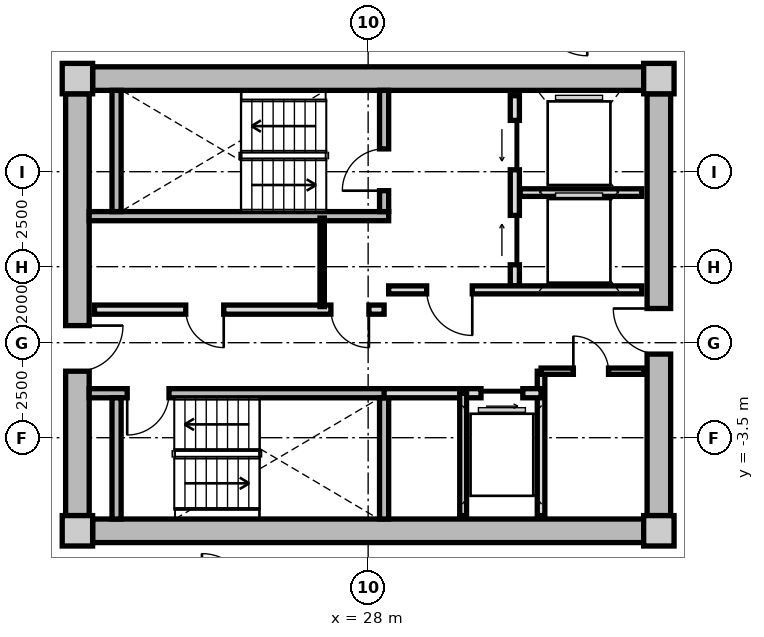
"""IFC4 building model, lengths in metres.
Left out: names, types, materials, properties, quantities, classifications, styles, units other than length and angle.
Written with IfcOpenShell. Run it as: python <this file> out.ifc"""

import sys

from ifc_helpers import new_model, si_unit, direction, frame, frame_2d, origin, origin_2d, place, context, subcontext, project, spatial, rectangle, extrude, source, transform, mapped, element, fill, save


model = new_model("IFC4")
c1 = context("Model", 3, precision=1e-05, world=origin(), true_north=direction((0.0, 1.0)))
c2 = subcontext(c1, "Body", "Model", "MODEL_VIEW")
j1 = project(units=[si_unit("LENGTHUNIT", "METRE"), si_unit("PLANEANGLEUNIT", "RADIAN")], contexts=[c1])
p1 = place(None, origin())
s1 = spatial("IfcSite", under=j1, at=p1, CompositionType="ELEMENT")
p2 = place(p1, origin())
s2 = spatial("IfcBuilding", under=s1, at=p2, CompositionType="ELEMENT")
p3 = place(p2, frame((0.0, 0.0, 158.7)))
s3 = spatial("IfcBuildingStorey", under=s2, at=p3, CompositionType="ELEMENT", Elevation=158.7)
m1 = source(origin(), c2, "Body", "SweptSolid", [
    extrude(rectangle(XDim=0.8, YDim=0.8, at=origin_2d()), origin(), (0.0, 0.0, 1.0), 3.05),
])
for number, where, z_axis, x_axis in (
    (1, (20.35, -5.95, 0.0), (0.0, 0.0, 1.0), (1.0, 0.0, 0.0)),
    (2, (35.65, -5.95, 0.0), (0.0, 0.0, 1.0), (1.0, 0.0, 0.0)),
    (3, (35.65, 5.95, 0.0), (0.0, 0.0, 1.0), (1.0, 0.0, 0.0)),
    (4, (20.35, 5.95, 0.0), (0.0, 0.0, 1.0), (1.0, 0.0, 0.0)),
):
    element("IfcColumn", number, at=place(p3, frame(where, z_axis=z_axis, x_axis=x_axis)), inside=s3, PredefinedType="COLUMN", context=c2, shape_type="MappedRepresentation", body=[
        mapped(m1, transform((0.0, 0.0, 0.0), x_axis=(1.0, 0.0, 0.0), y_axis=(0.0, 1.0, 0.0), z_axis=(0.0, 0.0, 1.0), scale=1.0)),
    ])
m2 = source(origin(), c2, "Body", "SweptSolid", [
    extrude(rectangle(XDim=14.5, YDim=0.62, at=frame_2d((7.25, 0.0))), origin(), (0.0, 0.0, 1.0), 2.81),
])
for number, where, z_axis, x_axis in (
    (5, (20.75, 5.95, 0.0), (0.0, 0.0, 1.0), (1.0, 0.0, 0.0)),
    (6, (35.25, -5.95, 0.0), (0.0, 0.0, 1.0), (-1.0, 0.0, 0.0)),
):
    element("IfcWall", number, at=place(p3, frame(where, z_axis=z_axis, x_axis=x_axis)), inside=s3, PredefinedType="SHEAR", context=c2, shape_type="MappedRepresentation", body=[
        mapped(m2, transform((0.0, 0.0, 0.0), x_axis=(1.0, 0.0, 0.0), y_axis=(0.0, 1.0, 0.0), z_axis=(0.0, 0.0, 1.0), scale=1.0)),
    ])
m3 = source(origin(), c2, "Body", "SweptSolid", [
    extrude(rectangle(XDim=11.1, YDim=0.62, at=frame_2d((5.55, 0.0))), origin(), (0.0, 0.0, 1.0), 2.81),
])
p4 = place(p3, frame((20.35, -5.55, 0.0), z_axis=(0.0, 0.0, 1.0), x_axis=(0.0, 1.0, 0.0)))
e7 = element("IfcWall", 7, at=p4, inside=s3, PredefinedType="SHEAR", context=c2, shape_type="MappedRepresentation", body=[
    mapped(m3, transform((0.0, 0.0, 0.0), x_axis=(1.0, 0.0, 0.0), y_axis=(0.0, 1.0, 0.0), z_axis=(0.0, 0.0, 1.0), scale=1.0)),
])
p5 = place(p4, frame((3.8, 0.0, 0.0)))
e8 = element("IfcOpeningElement", 8, at=p5, cuts=e7, PredefinedType="OPENING", context=c2, shape_type="SweptSolid", body=[
    extrude(rectangle(XDim=1.2, YDim=2.15, at=frame_2d((0.6, 1.075))), frame((0.0, 0.32, 0.0), z_axis=(0.0, -1.0, 0.0), x_axis=(1.0, 0.0, 0.0)), (0.0, 0.0, 1.0), 0.64),
])
p6 = place(p3, frame((35.65, 5.55, 0.0), z_axis=(0.0, 0.0, 1.0), x_axis=(0.0, -1.0, 0.0)))
e9 = element("IfcWall", 9, at=p6, inside=s3, PredefinedType="SHEAR", context=c2, shape_type="MappedRepresentation", body=[
    mapped(m3, transform((0.0, 0.0, 0.0), x_axis=(1.0, 0.0, 0.0), y_axis=(0.0, 1.0, 0.0), z_axis=(0.0, 0.0, 1.0), scale=1.0)),
])
p7 = place(p6, frame((5.65, 0.0, 0.0)))
e10 = element("IfcOpeningElement", 10, at=p7, cuts=e9, PredefinedType="OPENING", context=c2, shape_type="SweptSolid", body=[
    extrude(rectangle(XDim=1.2, YDim=2.15, at=frame_2d((0.6, 1.075))), frame((0.0, 0.32, 0.0), z_axis=(0.0, -1.0, 0.0), x_axis=(1.0, 0.0, 0.0)), (0.0, 0.0, 1.0), 0.64),
])
m4 = source(origin(), c2, "Body", "SweptSolid", [
    extrude(rectangle(XDim=7.88, YDim=0.24, at=frame_2d((3.94, 0.0))), origin(), (0.0, 0.0, 1.0), 2.81),
])
p8 = place(p3, frame((20.66, 2.33, 0.0), z_axis=(0.0, 0.0, 1.0), x_axis=(1.0, 0.0, 0.0)))
e11 = element("IfcWall", 11, at=p8, inside=s3, PredefinedType="PARTITIONING", context=c2, shape_type="MappedRepresentation", body=[
    mapped(m4, transform((0.0, 0.0, 0.0), x_axis=(1.0, 0.0, 0.0), y_axis=(0.0, 1.0, 0.0), z_axis=(0.0, 0.0, 1.0), scale=1.0)),
])
m5 = source(origin(), c2, "Body", "SweptSolid", [
    extrude(rectangle(XDim=3.19, YDim=0.24, at=frame_2d((1.595, 0.0))), origin(), (0.0, 0.0, 1.0), 2.81),
])
p9 = place(p3, frame((21.38, 2.45, 0.0), z_axis=(0.0, 0.0, 1.0), x_axis=(0.0, 1.0, 0.0)))
e12 = element("IfcWall", 12, at=p9, inside=s3, PredefinedType="PARTITIONING", context=c2, shape_type="MappedRepresentation", body=[
    mapped(m5, transform((0.0, 0.0, 0.0), x_axis=(1.0, 0.0, 0.0), y_axis=(0.0, 1.0, 0.0), z_axis=(0.0, 0.0, 1.0), scale=1.0)),
])
p10 = place(p3, frame((28.42, 2.45, 0.0), z_axis=(0.0, 0.0, 1.0), x_axis=(0.0, 1.0, 0.0)))
e13 = element("IfcWall", 13, at=p10, inside=s3, PredefinedType="PARTITIONING", context=c2, shape_type="MappedRepresentation", body=[
    mapped(m5, transform((0.0, 0.0, 0.0), x_axis=(1.0, 0.0, 0.0), y_axis=(0.0, 1.0, 0.0), z_axis=(0.0, 0.0, 1.0), scale=1.0)),
])
p11 = place(p10, frame((0.55, 0.0, 0.0)))
e14 = element("IfcOpeningElement", 14, at=p11, cuts=e13, PredefinedType="OPENING", context=c2, shape_type="SweptSolid", body=[
    extrude(rectangle(XDim=1.1, YDim=2.15, at=frame_2d((0.55, 1.075))), frame((0.0, 0.13, 0.0), z_axis=(0.0, -1.0, 0.0), x_axis=(1.0, 0.0, 0.0)), (0.0, 0.0, 1.0), 0.26),
])
p12 = place(p3, frame((20.66, -2.33, 0.0), z_axis=(0.0, 0.0, 1.0), x_axis=(1.0, 0.0, 0.0)))
e15 = element("IfcWall", 15, at=p12, inside=s3, PredefinedType="PARTITIONING", context=c2, shape_type="MappedRepresentation", body=[
    mapped(m4, transform((0.0, 0.0, 0.0), x_axis=(1.0, 0.0, 0.0), y_axis=(0.0, 1.0, 0.0), z_axis=(0.0, 0.0, 1.0), scale=1.0)),
])
p13 = place(p12, frame((1.0, 0.0, 0.0)))
e16 = element("IfcOpeningElement", 16, at=p13, cuts=e15, PredefinedType="OPENING", context=c2, shape_type="SweptSolid", body=[
    extrude(rectangle(XDim=1.1, YDim=2.15, at=frame_2d((0.55, 1.075))), frame((0.0, 0.13, 0.0), z_axis=(0.0, -1.0, 0.0), x_axis=(1.0, 0.0, 0.0)), (0.0, 0.0, 1.0), 0.26),
])
for number, where, z_axis, x_axis in (
    (17, (21.38, -5.64, 0.0), (0.0, 0.0, 1.0), (0.0, 1.0, 0.0)),
    (18, (28.42, -5.64, 0.0), (0.0, 0.0, 1.0), (0.0, 1.0, 0.0)),
):
    element("IfcWall", number, at=place(p3, frame(where, z_axis=z_axis, x_axis=x_axis)), inside=s3, PredefinedType="PARTITIONING", context=c2, shape_type="MappedRepresentation", body=[
        mapped(m5, transform((0.0, 0.0, 0.0), x_axis=(1.0, 0.0, 0.0), y_axis=(0.0, 1.0, 0.0), z_axis=(0.0, 0.0, 1.0), scale=1.0)),
    ])
m6 = source(origin(), c2, "Body", "SweptSolid", [
    extrude(rectangle(XDim=5.0, YDim=0.24, at=frame_2d((2.5, 0.0))), origin(), (0.0, 0.0, 1.0), 2.795),
])
p14 = place(p3, frame((31.86, 0.5, 0.0), z_axis=(0.0, 0.0, 1.0), x_axis=(0.0, 1.0, 0.0)))
e19 = element("IfcWall", 19, at=p14, inside=s3, PredefinedType="PARTITIONING", context=c2, shape_type="MappedRepresentation", body=[
    mapped(m6, transform((0.0, 0.0, 0.0), x_axis=(1.0, 0.0, 0.0), y_axis=(0.0, 1.0, 0.0), z_axis=(0.0, 0.0, 1.0), scale=1.0)),
])
p15 = place(p14, frame((3.05, 0.0, 0.0)))
e20 = element("IfcOpeningElement", 20, at=p15, cuts=e19, PredefinedType="OPENING", context=c2, shape_type="SweptSolid", body=[
    extrude(rectangle(XDim=1.3, YDim=2.2, at=frame_2d((0.65, 1.1))), frame((0.0, 0.13, 0.0), z_axis=(0.0, -1.0, 0.0), x_axis=(1.0, 0.0, 0.0)), (0.0, 0.0, 1.0), 0.26),
])
p16 = place(p14, frame((0.55, 0.0, 0.0)))
e21 = element("IfcOpeningElement", 21, at=p16, cuts=e19, PredefinedType="OPENING", context=c2, shape_type="SweptSolid", body=[
    extrude(rectangle(XDim=1.3, YDim=2.2, at=frame_2d((0.65, 1.1))), frame((0.0, 0.13, 0.0), z_axis=(0.0, -1.0, 0.0), x_axis=(1.0, 0.0, 0.0)), (0.0, 0.0, 1.0), 0.26),
])
m7 = source(origin(), c2, "Body", "SweptSolid", [
    extrude(rectangle(XDim=3.2, YDim=0.2, at=frame_2d((1.6, 0.0))), origin(), (0.0, 0.0, 1.0), 2.795),
])
p17 = place(p3, frame((32.0, 2.95, 0.0), z_axis=(0.0, 0.0, 1.0), x_axis=(1.0, 0.0, 0.0)))
e22 = element("IfcWall", 22, at=p17, inside=s3, PredefinedType="PARTITIONING", context=c2, shape_type="MappedRepresentation", body=[
    mapped(m7, transform((0.0, 0.0, 0.0), x_axis=(1.0, 0.0, 0.0), y_axis=(0.0, 1.0, 0.0), z_axis=(0.0, 0.0, 1.0), scale=1.0)),
])
m8 = source(origin(), c2, "Body", "SweptSolid", [
    extrude(rectangle(XDim=6.66, YDim=0.21, at=frame_2d((3.33, 0.0))), origin(), (0.0, 0.0, 1.0), 2.795),
])
p18 = place(p3, frame((28.54, 0.39, 0.0), z_axis=(0.0, 0.0, 1.0), x_axis=(1.0, 0.0, 0.0)))
e23 = element("IfcWall", 23, at=p18, inside=s3, PredefinedType="PARTITIONING", context=c2, shape_type="MappedRepresentation", body=[
    mapped(m8, transform((0.0, 0.0, 0.0), x_axis=(1.0, 0.0, 0.0), y_axis=(0.0, 1.0, 0.0), z_axis=(0.0, 0.0, 1.0), scale=1.0)),
])
p19 = place(p18, frame((1.0, 0.0, 0.0)))
e24 = element("IfcOpeningElement", 24, at=p19, cuts=e23, PredefinedType="OPENING", context=c2, shape_type="SweptSolid", body=[
    extrude(rectangle(XDim=1.2, YDim=2.15, at=frame_2d((0.6, 1.075))), frame((0.0, 0.115, 0.0), z_axis=(0.0, -1.0, 0.0), x_axis=(1.0, 0.0, 0.0)), (0.0, 0.0, 1.0), 0.23),
])
m9 = source(origin(), c2, "Body", "SweptSolid", [
    extrude(rectangle(XDim=7.62, YDim=0.24, at=frame_2d((3.81, 0.0))), origin(), (0.0, 0.0, 1.0), 2.795),
])
p20 = place(p3, frame((20.8, -0.13, 0.0), z_axis=(0.0, 0.0, 1.0), x_axis=(1.0, 0.0, 0.0)))
e25 = element("IfcWall", 25, at=p20, inside=s3, PredefinedType="PARTITIONING", context=c2, shape_type="MappedRepresentation", body=[
    mapped(m9, transform((0.0, 0.0, 0.0), x_axis=(1.0, 0.0, 0.0), y_axis=(0.0, 1.0, 0.0), z_axis=(0.0, 0.0, 1.0), scale=1.0)),
])
p21 = place(p20, frame((6.22, 0.0, 0.0)))
e26 = element("IfcOpeningElement", 26, at=p21, cuts=e25, PredefinedType="OPENING", context=c2, shape_type="SweptSolid", body=[
    extrude(rectangle(XDim=1.0, YDim=2.1, at=frame_2d((0.5, 1.05))), frame((0.0, 0.13, 0.0), z_axis=(0.0, -1.0, 0.0), x_axis=(1.0, 0.0, 0.0)), (0.0, 0.0, 1.0), 0.26),
])
p22 = place(p20, frame((2.4, 0.0, 0.0)))
e27 = element("IfcOpeningElement", 27, at=p22, cuts=e25, PredefinedType="OPENING", context=c2, shape_type="SweptSolid", body=[
    extrude(rectangle(XDim=1.0, YDim=2.1, at=frame_2d((0.5, 1.05))), frame((0.0, 0.13, 0.0), z_axis=(0.0, -1.0, 0.0), x_axis=(1.0, 0.0, 0.0)), (0.0, 0.0, 1.0), 0.26),
])
m10 = source(origin(), c2, "Body", "SweptSolid", [
    extrude(rectangle(XDim=2.33, YDim=0.115, at=frame_2d((1.165, 0.0))), origin(), (0.0, 0.0, 1.0), 2.795),
])
p23 = place(p3, frame((26.79, -0.05, 0.0), z_axis=(0.0, 0.0, 1.0), x_axis=(0.0, 1.0, 0.0)))
e28 = element("IfcWall", 28, at=p23, inside=s3, PredefinedType="PARTITIONING", context=c2, shape_type="MappedRepresentation", body=[
    mapped(m10, transform((0.0, 0.0, 0.0), x_axis=(1.0, 0.0, 0.0), y_axis=(0.0, 1.0, 0.0), z_axis=(0.0, 0.0, 1.0), scale=1.0)),
])
m11 = source(origin(), c2, "Body", "SweptSolid", [
    extrude(rectangle(XDim=3.8, YDim=0.2, at=frame_2d((1.9, 0.0))), origin(), (0.0, 0.0, 1.0), 2.795),
])
p24 = place(p3, frame((32.55, -5.55, 0.0), z_axis=(0.0, 0.0, 1.0), x_axis=(0.0, 1.0, 0.0)))
e29 = element("IfcWall", 29, at=p24, inside=s3, PredefinedType="PARTITIONING", context=c2, shape_type="MappedRepresentation", body=[
    mapped(m11, transform((0.0, 0.0, 0.0), x_axis=(1.0, 0.0, 0.0), y_axis=(0.0, 1.0, 0.0), z_axis=(0.0, 0.0, 1.0), scale=1.0)),
])
m12 = source(origin(), c2, "Body", "SweptSolid", [
    extrude(rectangle(XDim=4.13, YDim=0.24, at=frame_2d((2.065, 0.0))), origin(), (0.0, 0.0, 1.0), 2.795),
])
p25 = place(p3, frame((28.42, -2.33, 0.0), z_axis=(0.0, 0.0, 1.0), x_axis=(1.0, 0.0, 0.0)))
e30 = element("IfcWall", 30, at=p25, inside=s3, PredefinedType="PARTITIONING", context=c2, shape_type="MappedRepresentation", body=[
    mapped(m12, transform((0.0, 0.0, 0.0), x_axis=(1.0, 0.0, 0.0), y_axis=(0.0, 1.0, 0.0), z_axis=(0.0, 0.0, 1.0), scale=1.0)),
])
p26 = place(p25, frame((2.55, 0.0, 0.0)))
e31 = element("IfcOpeningElement", 31, at=p26, cuts=e30, PredefinedType="OPENING", context=c2, shape_type="SweptSolid", body=[
    extrude(rectangle(XDim=1.1, YDim=2.2, at=frame_2d((0.55, 1.1))), frame((0.0, 0.13, 0.0), z_axis=(0.0, -1.0, 0.0), x_axis=(1.0, 0.0, 0.0)), (0.0, 0.0, 1.0), 0.26),
])
m13 = source(origin(), c2, "Body", "SweptSolid", [
    extrude(rectangle(XDim=3.22, YDim=0.18, at=frame_2d((1.61, 0.0))), origin(), (0.0, 0.0, 1.0), 2.795),
])
p27 = place(p3, frame((30.5, -5.55, 0.0), z_axis=(0.0, 0.0, 1.0), x_axis=(0.0, 1.0, 0.0)))
e32 = element("IfcWall", 32, at=p27, inside=s3, PredefinedType="PARTITIONING", context=c2, shape_type="MappedRepresentation", body=[
    mapped(m13, transform((0.0, 0.0, 0.0), x_axis=(1.0, 0.0, 0.0), y_axis=(0.0, 1.0, 0.0), z_axis=(0.0, 0.0, 1.0), scale=1.0)),
])
m14 = source(origin(), c2, "Body", "SweptSolid", [
    extrude(rectangle(XDim=2.7, YDim=0.165, at=frame_2d((1.35, 0.0))), origin(), (0.0, 0.0, 1.0), 2.795),
])
p28 = place(p3, frame((32.55, -1.75, 0.0), z_axis=(0.0, 0.0, 1.0), x_axis=(1.0, 0.0, 0.0)))
e33 = element("IfcWall", 33, at=p28, inside=s3, PredefinedType="PARTITIONING", context=c2, shape_type="MappedRepresentation", body=[
    mapped(m14, transform((0.0, 0.0, 0.0), x_axis=(1.0, 0.0, 0.0), y_axis=(0.0, 1.0, 0.0), z_axis=(0.0, 0.0, 1.0), scale=1.0)),
])
p29 = place(p28, frame((0.85, 0.0, 0.0)))
e34 = element("IfcOpeningElement", 34, at=p29, cuts=e33, PredefinedType="OPENING", context=c2, shape_type="SweptSolid", body=[
    extrude(rectangle(XDim=0.925, YDim=2.1, at=frame_2d((0.462, 1.05))), frame((0.0, 0.093, 0.0), z_axis=(0.0, -1.0, 0.0), x_axis=(1.0, 0.0, 0.0)), (0.0, 0.0, 1.0), 0.185),
])
m15 = source(origin(), c2, "Body", "SweptSolid", [
    extrude(rectangle(XDim=1.1, YDim=2.15, at=frame_2d((0.55, 1.075))), frame((0.0, 0.025, 0.0), z_axis=(0.0, -1.0, 0.0), x_axis=(1.0, 0.0, 0.0)), (0.0, 0.0, 1.0), 0.05),
])
p30 = place(p11, origin())
e35 = element("IfcDoor", 35, at=p30, inside=s3, OperationType="SINGLE_SWING_LEFT", PredefinedType="DOOR", context=c2, shape_type="MappedRepresentation", body=[
    mapped(m15, transform((0.0, 0.0, 0.0), x_axis=(1.0, 0.0, 0.0), y_axis=(0.0, 1.0, 0.0), z_axis=(0.0, 0.0, 1.0), scale=1.0)),
])
fill(e14, e35)
p31 = place(p13, frame((1.1, 0.0, 0.0), z_axis=(0.0, 0.0, 1.0), x_axis=(-1.0, 0.0, 0.0)))
e36 = element("IfcDoor", 36, at=p31, inside=s3, OperationType="SINGLE_SWING_RIGHT", PredefinedType="DOOR", context=c2, shape_type="MappedRepresentation", body=[
    mapped(m15, transform((0.0, 0.0, 0.0), x_axis=(1.0, 0.0, 0.0), y_axis=(0.0, 1.0, 0.0), z_axis=(0.0, 0.0, 1.0), scale=1.0)),
])
fill(e16, e36)
m16 = source(origin(), c2, "Body", "SweptSolid", [
    extrude(rectangle(XDim=1.3, YDim=2.2, at=frame_2d((0.65, 1.1))), frame((0.0, 0.025, 0.0), z_axis=(0.0, -1.0, 0.0), x_axis=(1.0, 0.0, 0.0)), (0.0, 0.0, 1.0), 0.05),
])
p32 = place(p15, origin())
e37 = element("IfcDoor", 37, at=p32, inside=s3, OperationType="SLIDING_TO_LEFT", PredefinedType="DOOR", context=c2, shape_type="MappedRepresentation", body=[
    mapped(m16, transform((0.0, 0.0, 0.0), x_axis=(1.0, 0.0, 0.0), y_axis=(0.0, 1.0, 0.0), z_axis=(0.0, 0.0, 1.0), scale=1.0)),
])
fill(e20, e37)
p33 = place(p16, origin())
e38 = element("IfcDoor", 38, at=p33, inside=s3, OperationType="SLIDING_TO_RIGHT", PredefinedType="DOOR", context=c2, shape_type="MappedRepresentation", body=[
    mapped(m16, transform((0.0, 0.0, 0.0), x_axis=(1.0, 0.0, 0.0), y_axis=(0.0, 1.0, 0.0), z_axis=(0.0, 0.0, 1.0), scale=1.0)),
])
fill(e21, e38)
m17 = source(origin(), c2, "Body", "SweptSolid", [
    extrude(rectangle(XDim=1.2, YDim=2.15, at=frame_2d((0.6, 1.075))), frame((0.0, 0.025, 0.0), z_axis=(0.0, -1.0, 0.0), x_axis=(1.0, 0.0, 0.0)), (0.0, 0.0, 1.0), 0.05),
])
p34 = place(p19, frame((1.2, 0.0, 0.0), z_axis=(0.0, 0.0, 1.0), x_axis=(-1.0, 0.0, 0.0)))
e39 = element("IfcDoor", 39, at=p34, inside=s3, OperationType="SINGLE_SWING_LEFT", PredefinedType="DOOR", context=c2, shape_type="MappedRepresentation", body=[
    mapped(m17, transform((0.0, 0.0, 0.0), x_axis=(1.0, 0.0, 0.0), y_axis=(0.0, 1.0, 0.0), z_axis=(0.0, 0.0, 1.0), scale=1.0)),
])
fill(e24, e39)
p35 = place(p5, frame((1.2, 0.0, 0.0), z_axis=(0.0, 0.0, 1.0), x_axis=(-1.0, 0.0, 0.0)))
e40 = element("IfcDoor", 40, at=p35, inside=s3, OperationType="SINGLE_SWING_LEFT", PredefinedType="DOOR", context=c2, shape_type="MappedRepresentation", body=[
    mapped(m17, transform((0.0, 0.0, 0.0), x_axis=(1.0, 0.0, 0.0), y_axis=(0.0, 1.0, 0.0), z_axis=(0.0, 0.0, 1.0), scale=1.0)),
])
fill(e8, e40)
p36 = place(p7, frame((1.2, 0.0, 0.0), z_axis=(0.0, 0.0, 1.0), x_axis=(-1.0, 0.0, 0.0)))
e41 = element("IfcDoor", 41, at=p36, inside=s3, OperationType="SINGLE_SWING_RIGHT", PredefinedType="DOOR", context=c2, shape_type="MappedRepresentation", body=[
    mapped(m17, transform((0.0, 0.0, 0.0), x_axis=(1.0, 0.0, 0.0), y_axis=(0.0, 1.0, 0.0), z_axis=(0.0, 0.0, 1.0), scale=1.0)),
])
fill(e10, e41)
m18 = source(origin(), c2, "Body", "SweptSolid", [
    extrude(rectangle(XDim=1.0, YDim=2.1, at=frame_2d((0.5, 1.05))), frame((0.0, 0.025, 0.0), z_axis=(0.0, -1.0, 0.0), x_axis=(1.0, 0.0, 0.0)), (0.0, 0.0, 1.0), 0.05),
])
p37 = place(p21, frame((1.0, 0.0, 0.0), z_axis=(0.0, 0.0, 1.0), x_axis=(-1.0, 0.0, 0.0)))
e42 = element("IfcDoor", 42, at=p37, inside=s3, OperationType="SINGLE_SWING_LEFT", PredefinedType="DOOR", context=c2, shape_type="MappedRepresentation", body=[
    mapped(m18, transform((0.0, 0.0, 0.0), x_axis=(1.0, 0.0, 0.0), y_axis=(0.0, 1.0, 0.0), z_axis=(0.0, 0.0, 1.0), scale=1.0)),
])
fill(e26, e42)
p38 = place(p22, frame((1.0, 0.0, 0.0), z_axis=(0.0, 0.0, 1.0), x_axis=(-1.0, 0.0, 0.0)))
e43 = element("IfcDoor", 43, at=p38, inside=s3, OperationType="SINGLE_SWING_LEFT", PredefinedType="DOOR", context=c2, shape_type="MappedRepresentation", body=[
    mapped(m18, transform((0.0, 0.0, 0.0), x_axis=(1.0, 0.0, 0.0), y_axis=(0.0, 1.0, 0.0), z_axis=(0.0, 0.0, 1.0), scale=1.0)),
])
fill(e27, e43)
m19 = source(origin(), c2, "Body", "SweptSolid", [
    extrude(rectangle(XDim=1.1, YDim=2.2, at=frame_2d((0.55, 1.1))), frame((0.0, 0.025, 0.0), z_axis=(0.0, -1.0, 0.0), x_axis=(1.0, 0.0, 0.0)), (0.0, 0.0, 1.0), 0.05),
])
p39 = place(p26, frame((1.1, 0.0, 0.0), z_axis=(0.0, 0.0, 1.0), x_axis=(-1.0, 0.0, 0.0)))
e44 = element("IfcDoor", 44, at=p39, inside=s3, OperationType="SLIDING_TO_RIGHT", PredefinedType="DOOR", context=c2, shape_type="MappedRepresentation", body=[
    mapped(m19, transform((0.0, 0.0, 0.0), x_axis=(1.0, 0.0, 0.0), y_axis=(0.0, 1.0, 0.0), z_axis=(0.0, 0.0, 1.0), scale=1.0)),
])
fill(e31, e44)
m20 = source(origin(), c2, "Body", "SweptSolid", [
    extrude(rectangle(XDim=0.925, YDim=2.1, at=frame_2d((0.462, 1.05))), frame((0.0, 0.025, 0.0), z_axis=(0.0, -1.0, 0.0), x_axis=(1.0, 0.0, 0.0)), (0.0, 0.0, 1.0), 0.05),
])
p40 = place(p29, origin())
e45 = element("IfcDoor", 45, at=p40, inside=s3, OperationType="SINGLE_SWING_LEFT", PredefinedType="DOOR", context=c2, shape_type="MappedRepresentation", body=[
    mapped(m20, transform((0.0, 0.0, 0.0), x_axis=(1.0, 0.0, 0.0), y_axis=(0.0, 1.0, 0.0), z_axis=(0.0, 0.0, 1.0), scale=1.0)),
])
fill(e34, e45)
save(model, sys.argv[1])
